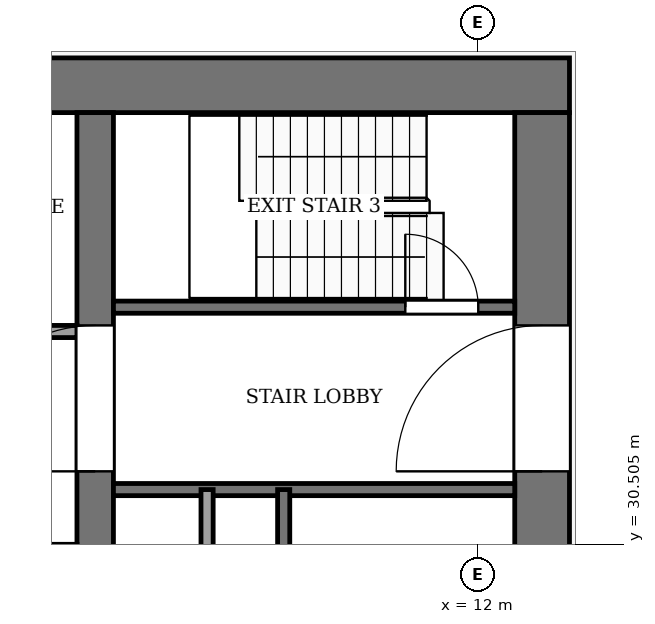
"""IFC4 building model, lengths in metres.
Left out: names, types, materials, properties, quantities, classifications, styles, units other than length and angle.
Written with IfcOpenShell. Run it as: python <this file> out.ifc"""

import sys

from ifc_helpers import new_model, si_unit, direction, frame, frame_2d, origin, place, context, subcontext, project, spatial, rectangle, extrude, element, fill, save


model = new_model("IFC4")
c1 = context("Model", 3, precision=1e-05, world=origin(), true_north=direction((0.0, 1.0)))
c2 = subcontext(c1, "Body", "Model", "MODEL_VIEW")
j1 = project(units=[si_unit("LENGTHUNIT", "METRE"), si_unit("PLANEANGLEUNIT", "RADIAN")], contexts=[c1])
p1 = place(None, origin())
s1 = spatial("IfcSite", under=j1, at=p1, CompositionType="ELEMENT")
p2 = place(p1, origin())
s2 = spatial("IfcBuilding", under=s1, at=p2, CompositionType="ELEMENT")
p3 = place(p2, frame((0.0, 0.0, 202.0)))
s3 = spatial("IfcBuildingStorey", under=s2, at=p3, CompositionType="ELEMENT", Elevation=202.0)
p4 = place(p3, frame((-13.5, 38.05, -0.13), z_axis=(0.0, 0.0, 1.0), x_axis=(1.0, 0.0, 0.0)))
e1 = element("IfcWall", 1, at=p4, inside=s3, PredefinedType="SHEAR", context=c2, shape_type="SweptSolid", body=[
    extrude(rectangle(XDim=27.0, YDim=0.9, at=frame_2d((13.5, 0.0))), origin(), (0.0, 0.0, 1.0), 4.0),
])
p5 = place(p3, frame((13.05, 18.4, -0.13), z_axis=(0.0, 0.0, 1.0), x_axis=(0.0, 1.0, 0.0)))
e2 = element("IfcWall", 2, at=p5, inside=s3, PredefinedType="SHEAR", context=c2, shape_type="SweptSolid", body=[
    extrude(rectangle(XDim=19.2, YDim=0.9, at=frame_2d((9.6, 0.0))), origin(), (0.0, 0.0, 1.0), 4.0),
])
p6 = place(p5, frame((2.8, 0.0, 0.13)))
e3 = element("IfcOpeningElement", 3, at=p6, cuts=e2, PredefinedType="OPENING", context=c2, shape_type="SweptSolid", body=[
    extrude(rectangle(XDim=2.4, YDim=2.4, at=frame_2d((1.2, 1.2))), frame((0.0, 0.46, 0.0), z_axis=(0.0, -1.0, 0.0), x_axis=(1.0, 0.0, 0.0)), (0.0, 0.0, 1.0), 0.92),
])
p7 = place(p5, frame((13.3, 0.0, 0.13)))
e4 = element("IfcOpeningElement", 4, at=p7, cuts=e2, PredefinedType="OPENING", context=c2, shape_type="SweptSolid", body=[
    extrude(rectangle(XDim=2.4, YDim=2.4, at=frame_2d((1.2, 1.2))), frame((0.0, 0.46, 0.0), z_axis=(0.0, -1.0, 0.0), x_axis=(1.0, 0.0, 0.0)), (0.0, 0.0, 1.0), 0.92),
])
p8 = place(p3, frame((5.7, 18.4, -0.13), z_axis=(0.0, 0.0, 1.0), x_axis=(0.0, 1.0, 0.0)))
e5 = element("IfcWall", 5, at=p8, inside=s3, PredefinedType="SHEAR", context=c2, shape_type="SweptSolid", body=[
    extrude(rectangle(XDim=19.2, YDim=0.6, at=frame_2d((9.6, 0.0))), origin(), (0.0, 0.0, 1.0), 4.0),
])
p9 = place(p8, frame((8.35, 0.0, 0.13)))
e6 = element("IfcOpeningElement", 6, at=p9, cuts=e5, PredefinedType="OPENING", context=c2, shape_type="SweptSolid", body=[
    extrude(rectangle(XDim=0.9, YDim=2.1, at=frame_2d((0.45, 1.05))), frame((0.0, 0.31, 0.0), z_axis=(0.0, -1.0, 0.0), x_axis=(1.0, 0.0, 0.0)), (0.0, 0.0, 1.0), 0.62),
])
p10 = place(p8, frame((13.3, 0.0, 0.13)))
e7 = element("IfcOpeningElement", 7, at=p10, cuts=e5, PredefinedType="OPENING", context=c2, shape_type="SweptSolid", body=[
    extrude(rectangle(XDim=2.4, YDim=2.4, at=frame_2d((1.2, 1.2))), frame((0.0, 0.31, 0.0), z_axis=(0.0, -1.0, 0.0), x_axis=(1.0, 0.0, 0.0)), (0.0, 0.0, 1.0), 0.62),
])
p11 = place(p3, frame((6.0, 31.4, 0.0), z_axis=(0.0, 0.0, 1.0), x_axis=(1.0, 0.0, 0.0)))
e8 = element("IfcWall", 8, at=p11, inside=s3, PredefinedType="PARTITIONING", context=c2, shape_type="SweptSolid", body=[
    extrude(rectangle(XDim=6.6, YDim=0.2, at=frame_2d((3.3, 0.0))), origin(), (0.0, 0.0, 1.0), 3.87),
])
p12 = place(p3, frame((-5.4, 34.0, 0.0), z_axis=(0.0, 0.0, 1.0), x_axis=(1.0, 0.0, 0.0)))
e9 = element("IfcWall", 9, at=p12, inside=s3, PredefinedType="PARTITIONING", context=c2, shape_type="SweptSolid", body=[
    extrude(rectangle(XDim=10.8, YDim=0.2, at=frame_2d((5.4, 0.0))), origin(), (0.0, 0.0, 1.0), 3.87),
])
p13 = place(p12, frame((6.15, 0.0, 0.0)))
e10 = element("IfcOpeningElement", 10, at=p13, cuts=e9, PredefinedType="OPENING", context=c2, shape_type="SweptSolid", body=[
    extrude(rectangle(XDim=1.2, YDim=2.2, at=frame_2d((0.6, 1.1))), frame((0.0, 0.11, 0.0), z_axis=(0.0, -1.0, 0.0), x_axis=(1.0, 0.0, 0.0)), (0.0, 0.0, 1.0), 0.22),
])
p14 = place(p12, frame((8.95, 0.0, 0.0)))
e11 = element("IfcOpeningElement", 11, at=p14, cuts=e9, PredefinedType="OPENING", context=c2, shape_type="SweptSolid", body=[
    extrude(rectangle(XDim=1.0, YDim=2.1, at=frame_2d((0.5, 1.05))), frame((0.0, 0.11, 0.0), z_axis=(0.0, -1.0, 0.0), x_axis=(1.0, 0.0, 0.0)), (0.0, 0.0, 1.0), 0.22),
])
p15 = place(p3, frame((6.0, 34.4, 0.0), z_axis=(0.0, 0.0, 1.0), x_axis=(1.0, 0.0, 0.0)))
e12 = element("IfcWall", 12, at=p15, inside=s3, PredefinedType="PARTITIONING", context=c2, shape_type="SweptSolid", body=[
    extrude(rectangle(XDim=6.6, YDim=0.2, at=frame_2d((3.3, 0.0))), origin(), (0.0, 0.0, 1.0), 3.87),
])
p16 = place(p15, frame((4.8, 0.0, 0.0)))
e13 = element("IfcOpeningElement", 13, at=p16, cuts=e12, PredefinedType="OPENING", context=c2, shape_type="SweptSolid", body=[
    extrude(rectangle(XDim=1.2, YDim=2.2, at=frame_2d((0.6, 1.1))), frame((0.0, 0.11, 0.0), z_axis=(0.0, -1.0, 0.0), x_axis=(1.0, 0.0, 0.0)), (0.0, 0.0, 1.0), 0.22),
])
for number, where, z_axis, x_axis in (
    (14, (7.54, 24.0, 0.0), (0.0, 0.0, 1.0), (0.0, 1.0, 0.0)),
    (15, (8.8, 24.0, 0.0), (0.0, 0.0, 1.0), (0.0, 1.0, 0.0)),
):
    element("IfcWall", number, at=place(p3, frame(where, z_axis=z_axis, x_axis=x_axis)), inside=s3, PredefinedType="PARTITIONING", context=c2, shape_type="SweptSolid", body=[
        extrude(rectangle(XDim=7.4, YDim=0.2, at=frame_2d((3.7, 0.0))), origin(), (0.0, 0.0, 1.0), 3.87),
    ])
p17 = place(p16, origin())
e16 = element("IfcDoor", 16, at=p17, inside=s3, OperationType="SINGLE_SWING_LEFT", PredefinedType="DOOR", context=c2, shape_type="SweptSolid", body=[
    extrude(rectangle(XDim=1.2, YDim=2.2, at=frame_2d((0.6, 1.1))), frame((0.0, 0.025, 0.0), z_axis=(0.0, -1.0, 0.0), x_axis=(1.0, 0.0, 0.0)), (0.0, 0.0, 1.0), 0.05),
])
fill(e13, e16)
p18 = place(p10, origin())
e17 = element("IfcDoor", 17, at=p18, inside=s3, OperationType="DOUBLE_DOOR_SINGLE_SWING", PredefinedType="DOOR", context=c2, shape_type="SweptSolid", body=[
    extrude(rectangle(XDim=2.4, YDim=2.4, at=frame_2d((1.2, 1.2))), frame((0.0, 0.025, 0.0), z_axis=(0.0, -1.0, 0.0), x_axis=(1.0, 0.0, 0.0)), (0.0, 0.0, 1.0), 0.05),
])
fill(e7, e17)
p19 = place(p7, origin())
e18 = element("IfcDoor", 18, at=p19, inside=s3, OperationType="DOUBLE_DOOR_SINGLE_SWING", PredefinedType="DOOR", context=c2, shape_type="SweptSolid", body=[
    extrude(rectangle(XDim=2.4, YDim=2.4, at=frame_2d((1.2, 1.2))), frame((0.0, 0.025, 0.0), z_axis=(0.0, -1.0, 0.0), x_axis=(1.0, 0.0, 0.0)), (0.0, 0.0, 1.0), 0.05),
])
fill(e4, e18)
save(model, sys.argv[1])
